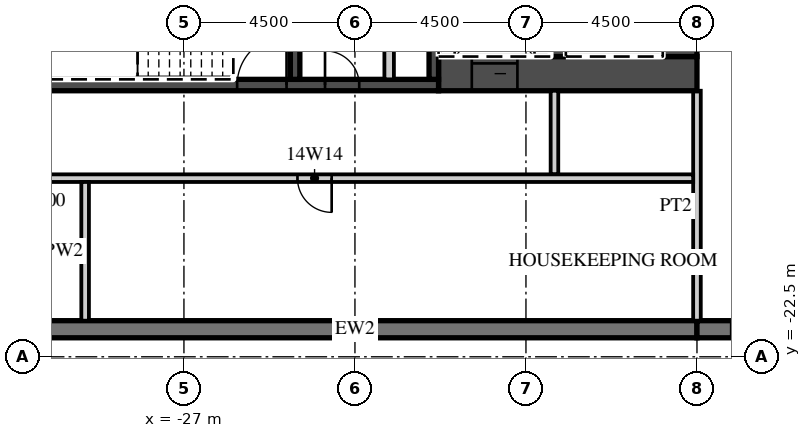
"""IFC4 building model, lengths in metres.
Left out: names, types, materials, properties, quantities, classifications, styles, units other than length and angle.
Written with IfcOpenShell. Run it as: python <this file> out.ifc"""

import sys

from ifc_helpers import new_model, si_unit, direction, frame, frame_2d, origin, place, context, subcontext, project, spatial, rectangle, extrude, element, fill, save


model = new_model("IFC4")
c1 = context("Model", 3, precision=1e-05, world=origin(), true_north=direction((0.0, 1.0)))
c2 = subcontext(c1, "Body", "Model", "MODEL_VIEW")
j1 = project(units=[si_unit("LENGTHUNIT", "METRE"), si_unit("PLANEANGLEUNIT", "RADIAN")], contexts=[c1])
p1 = place(None, origin())
s1 = spatial("IfcSite", under=j1, at=p1, CompositionType="ELEMENT")
p2 = place(p1, origin())
s2 = spatial("IfcBuilding", under=s1, at=p2, CompositionType="ELEMENT")
p3 = place(p2, frame((0.0, 0.0, 76.5)))
s3 = spatial("IfcBuildingStorey", under=s2, at=p3, CompositionType="ELEMENT", Elevation=76.5)
p4 = place(p3, frame((-31.5, -21.775, 0.0), z_axis=(0.0, 0.0, 1.0), x_axis=(1.0, 0.0, 0.0)))
e1 = element("IfcWall", 1, at=p4, inside=s3, PredefinedType="SOLIDWALL", context=c2, shape_type="SweptSolid", body=[
    extrude(rectangle(XDim=18.0, YDim=0.45, at=frame_2d((9.0, 0.0))), origin(), (0.0, 0.0, 1.0), 3.02),
])
p5 = place(p3, frame((-13.5, -21.775, 0.0), z_axis=(0.0, 0.0, 1.0), x_axis=(1.0, 0.0, 0.0)))
e2 = element("IfcWall", 2, at=p5, inside=s3, PredefinedType="SOLIDWALL", context=c2, shape_type="SweptSolid", body=[
    extrude(rectangle(XDim=54.5, YDim=0.45, at=frame_2d((27.25, 0.0))), origin(), (0.0, 0.0, 1.0), 3.02),
])
p6 = place(p5, frame((0.9, 0.0, 0.45)))
e3 = element("IfcOpeningElement", 3, at=p6, cuts=e2, PredefinedType="OPENING", context=c2, shape_type="SweptSolid", body=[
    extrude(rectangle(XDim=2.7, YDim=2.25, at=frame_2d((1.35, 1.125))), frame((0.0, 0.235, 0.0), z_axis=(0.0, -1.0, 0.0), x_axis=(1.0, 0.0, 0.0)), (0.0, 0.0, 1.0), 0.47),
])
p7 = place(p5, frame((5.4, 0.0, 0.45)))
e4 = element("IfcOpeningElement", 4, at=p7, cuts=e2, PredefinedType="OPENING", context=c2, shape_type="SweptSolid", body=[
    extrude(rectangle(XDim=2.7, YDim=2.25, at=frame_2d((1.35, 1.125))), frame((0.0, 0.235, 0.0), z_axis=(0.0, -1.0, 0.0), x_axis=(1.0, 0.0, 0.0)), (0.0, 0.0, 1.0), 0.47),
])
p8 = place(p5, frame((9.9, 0.0, 0.45)))
e5 = element("IfcOpeningElement", 5, at=p8, cuts=e2, PredefinedType="OPENING", context=c2, shape_type="SweptSolid", body=[
    extrude(rectangle(XDim=2.7, YDim=2.25, at=frame_2d((1.35, 1.125))), frame((0.0, 0.235, 0.0), z_axis=(0.0, -1.0, 0.0), x_axis=(1.0, 0.0, 0.0)), (0.0, 0.0, 1.0), 0.47),
])
p9 = place(p5, frame((14.4, 0.0, 0.45)))
e6 = element("IfcOpeningElement", 6, at=p9, cuts=e2, PredefinedType="OPENING", context=c2, shape_type="SweptSolid", body=[
    extrude(rectangle(XDim=2.7, YDim=2.25, at=frame_2d((1.35, 1.125))), frame((0.0, 0.235, 0.0), z_axis=(0.0, -1.0, 0.0), x_axis=(1.0, 0.0, 0.0)), (0.0, 0.0, 1.0), 0.47),
])
p10 = place(p5, frame((18.9, 0.0, 0.45)))
e7 = element("IfcOpeningElement", 7, at=p10, cuts=e2, PredefinedType="OPENING", context=c2, shape_type="SweptSolid", body=[
    extrude(rectangle(XDim=2.7, YDim=2.25, at=frame_2d((1.35, 1.125))), frame((0.0, 0.235, 0.0), z_axis=(0.0, -1.0, 0.0), x_axis=(1.0, 0.0, 0.0)), (0.0, 0.0, 1.0), 0.47),
])
p11 = place(p5, frame((23.4, 0.0, 0.45)))
e8 = element("IfcOpeningElement", 8, at=p11, cuts=e2, PredefinedType="OPENING", context=c2, shape_type="SweptSolid", body=[
    extrude(rectangle(XDim=2.7, YDim=2.25, at=frame_2d((1.35, 1.125))), frame((0.0, 0.235, 0.0), z_axis=(0.0, -1.0, 0.0), x_axis=(1.0, 0.0, 0.0)), (0.0, 0.0, 1.0), 0.47),
])
p12 = place(p5, frame((27.9, 0.0, 0.45)))
e9 = element("IfcOpeningElement", 9, at=p12, cuts=e2, PredefinedType="OPENING", context=c2, shape_type="SweptSolid", body=[
    extrude(rectangle(XDim=2.7, YDim=2.25, at=frame_2d((1.35, 1.125))), frame((0.0, 0.235, 0.0), z_axis=(0.0, -1.0, 0.0), x_axis=(1.0, 0.0, 0.0)), (0.0, 0.0, 1.0), 0.47),
])
p13 = place(p5, frame((32.4, 0.0, 0.45)))
e10 = element("IfcOpeningElement", 10, at=p13, cuts=e2, PredefinedType="OPENING", context=c2, shape_type="SweptSolid", body=[
    extrude(rectangle(XDim=2.7, YDim=2.25, at=frame_2d((1.35, 1.125))), frame((0.0, 0.235, 0.0), z_axis=(0.0, -1.0, 0.0), x_axis=(1.0, 0.0, 0.0)), (0.0, 0.0, 1.0), 0.47),
])
p14 = place(p5, frame((36.9, 0.0, 0.45)))
e11 = element("IfcOpeningElement", 11, at=p14, cuts=e2, PredefinedType="OPENING", context=c2, shape_type="SweptSolid", body=[
    extrude(rectangle(XDim=2.7, YDim=2.25, at=frame_2d((1.35, 1.125))), frame((0.0, 0.235, 0.0), z_axis=(0.0, -1.0, 0.0), x_axis=(1.0, 0.0, 0.0)), (0.0, 0.0, 1.0), 0.47),
])
p15 = place(p5, frame((41.4, 0.0, 0.45)))
e12 = element("IfcOpeningElement", 12, at=p15, cuts=e2, PredefinedType="OPENING", context=c2, shape_type="SweptSolid", body=[
    extrude(rectangle(XDim=2.7, YDim=2.25, at=frame_2d((1.35, 1.125))), frame((0.0, 0.235, 0.0), z_axis=(0.0, -1.0, 0.0), x_axis=(1.0, 0.0, 0.0)), (0.0, 0.0, 1.0), 0.47),
])
p16 = place(p5, frame((45.9, 0.0, 0.45)))
e13 = element("IfcOpeningElement", 13, at=p16, cuts=e2, PredefinedType="OPENING", context=c2, shape_type="SweptSolid", body=[
    extrude(rectangle(XDim=2.7, YDim=2.25, at=frame_2d((1.35, 1.125))), frame((0.0, 0.235, 0.0), z_axis=(0.0, -1.0, 0.0), x_axis=(1.0, 0.0, 0.0)), (0.0, 0.0, 1.0), 0.47),
])
p17 = place(p5, frame((50.4, 0.0, 0.45)))
e14 = element("IfcOpeningElement", 14, at=p17, cuts=e2, PredefinedType="OPENING", context=c2, shape_type="SweptSolid", body=[
    extrude(rectangle(XDim=2.7, YDim=2.25, at=frame_2d((1.35, 1.125))), frame((0.0, 0.235, 0.0), z_axis=(0.0, -1.0, 0.0), x_axis=(1.0, 0.0, 0.0)), (0.0, 0.0, 1.0), 0.47),
])
p18 = place(p3, frame((-13.5, -21.55, 0.0), z_axis=(0.0, 0.0, 1.0), x_axis=(0.0, 1.0, 0.0)))
e15 = element("IfcWall", 15, at=p18, inside=s3, PredefinedType="PARTITIONING", context=c2, shape_type="SweptSolid", body=[
    extrude(rectangle(XDim=6.05, YDim=0.2, at=frame_2d((3.025, 0.0))), origin(), (0.0, 0.0, 1.0), 3.02),
])
p19 = place(p3, frame((-20.3, -15.05, 0.0), z_axis=(0.0, 0.0, 1.0), x_axis=(1.0, 0.0, 0.0)))
e16 = element("IfcWall", 16, at=p19, inside=s3, PredefinedType="SHEAR", context=c2, shape_type="SweptSolid", body=[
    extrude(rectangle(XDim=6.8, YDim=0.9, at=frame_2d((3.4, 0.0))), origin(), (0.0, 0.0, 1.0), 3.02),
])
p20 = place(p19, frame((0.875, 0.0, 0.0)))
e17 = element("IfcOpeningElement", 17, at=p20, cuts=e16, PredefinedType="OPENING", context=c2, shape_type="SweptSolid", body=[
    extrude(rectangle(XDim=1.2, YDim=2.1, at=frame_2d((0.6, 1.05))), frame((0.0, 0.46, 0.0), z_axis=(0.0, -1.0, 0.0), x_axis=(1.0, 0.0, 0.0)), (0.0, 0.0, 1.0), 0.92),
])
p21 = place(p3, frame((-30.6, -15.35, 0.0), z_axis=(0.0, 0.0, 1.0), x_axis=(1.0, 0.0, 0.0)))
e18 = element("IfcWall", 18, at=p21, inside=s3, PredefinedType="SHEAR", context=c2, shape_type="SweptSolid", body=[
    extrude(rectangle(XDim=10.3, YDim=0.3, at=frame_2d((5.15, 0.0))), origin(), (0.0, 0.0, 1.0), 3.02),
])
p22 = place(p21, frame((5.0, 0.0, 0.0)))
e19 = element("IfcOpeningElement", 19, at=p22, cuts=e18, PredefinedType="OPENING", context=c2, shape_type="SweptSolid", body=[
    extrude(rectangle(XDim=1.3, YDim=2.1, at=frame_2d((0.65, 1.05))), frame((0.0, 0.16, 0.0), z_axis=(0.0, -1.0, 0.0), x_axis=(1.0, 0.0, 0.0)), (0.0, 0.0, 1.0), 0.32),
])
p23 = place(p21, frame((7.312, 0.0, 0.0)))
e20 = element("IfcOpeningElement", 20, at=p23, cuts=e18, PredefinedType="OPENING", context=c2, shape_type="SweptSolid", body=[
    extrude(rectangle(XDim=0.9, YDim=2.1, at=frame_2d((0.45, 1.05))), frame((0.0, 0.16, 0.0), z_axis=(0.0, -1.0, 0.0), x_axis=(1.0, 0.0, 0.0)), (0.0, 0.0, 1.0), 0.32),
])
p24 = place(p3, frame((-13.95, -14.6, 0.0), z_axis=(0.0, 0.0, 1.0), x_axis=(0.0, 1.0, 0.0)))
e21 = element("IfcWall", 21, at=p24, inside=s3, PredefinedType="SHEAR", context=c2, shape_type="SweptSolid", body=[
    extrude(rectangle(XDim=12.2, YDim=0.9, at=frame_2d((6.1, 0.0))), origin(), (0.0, 0.0, 1.0), 3.02),
])
p25 = place(p3, frame((-17.15, -14.6, 0.0), z_axis=(0.0, 0.0, 1.0), x_axis=(0.0, 1.0, 0.0)))
e22 = element("IfcWall", 22, at=p25, inside=s3, PredefinedType="SHEAR", context=c2, shape_type="SweptSolid", body=[
    extrude(rectangle(XDim=5.8, YDim=0.4, at=frame_2d((2.9, 0.0))), origin(), (0.0, 0.0, 1.0), 3.02),
])
for number, where, z_axis, x_axis in (
    (23, (-20.425, -15.2, 0.0), (0.0, 0.0, 1.0), (0.0, 1.0, 0.0)),
    (24, (-24.075, -15.2, 0.0), (0.0, 0.0, 1.0), (0.0, 1.0, 0.0)),
):
    element("IfcWall", number, at=place(p3, frame(where, z_axis=z_axis, x_axis=x_axis)), inside=s3, PredefinedType="SHEAR", context=c2, shape_type="SweptSolid", body=[
        extrude(rectangle(XDim=3.25, YDim=0.25, at=frame_2d((1.625, 0.0))), origin(), (0.0, 0.0, 1.0), 3.02),
    ])
p26 = place(p3, frame((-21.6, -15.2, 0.0), z_axis=(0.0, 0.0, 1.0), x_axis=(0.0, 1.0, 0.0)))
e25 = element("IfcWall", 25, at=p26, inside=s3, PredefinedType="PARTITIONING", context=c2, shape_type="SweptSolid", body=[
    extrude(rectangle(XDim=3.25, YDim=0.25, at=frame_2d((1.625, 0.0))), origin(), (0.0, 0.0, 1.0), 3.02),
])
p27 = place(p3, frame((-17.25, -17.7, 0.0), z_axis=(0.0, 0.0, 1.0), x_axis=(0.0, 1.0, 0.0)))
e26 = element("IfcWall", 26, at=p27, inside=s3, PredefinedType="PARTITIONING", context=c2, shape_type="SweptSolid", body=[
    extrude(rectangle(XDim=2.2, YDim=0.2, at=frame_2d((1.1, 0.0))), origin(), (0.0, 0.0, 1.0), 3.02),
])
p28 = place(p3, frame((-44.55, -17.8, 0.0), z_axis=(0.0, 0.0, 1.0), x_axis=(1.0, 0.0, 0.0)))
e27 = element("IfcWall", 27, at=p28, inside=s3, PredefinedType="PARTITIONING", context=c2, shape_type="SweptSolid", body=[
    extrude(rectangle(XDim=30.95, YDim=0.2, at=frame_2d((15.475, 0.0))), origin(), (0.0, 0.0, 1.0), 3.02),
])
p29 = place(p28, frame((12.238, 0.0, 0.0)))
e28 = element("IfcOpeningElement", 28, at=p29, cuts=e27, PredefinedType="OPENING", context=c2, shape_type="SweptSolid", body=[
    extrude(rectangle(XDim=0.9, YDim=2.1, at=frame_2d((0.45, 1.05))), frame((0.0, 0.11, 0.0), z_axis=(0.0, -1.0, 0.0), x_axis=(1.0, 0.0, 0.0)), (0.0, 0.0, 1.0), 0.22),
])
p30 = place(p28, frame((20.538, 0.0, 0.0)))
e29 = element("IfcOpeningElement", 29, at=p30, cuts=e27, PredefinedType="OPENING", context=c2, shape_type="SweptSolid", body=[
    extrude(rectangle(XDim=0.9, YDim=2.1, at=frame_2d((0.45, 1.05))), frame((0.0, 0.11, 0.0), z_axis=(0.0, -1.0, 0.0), x_axis=(1.0, 0.0, 0.0)), (0.0, 0.0, 1.0), 0.22),
])
p31 = place(p3, frame((-29.6, -21.55, 0.0), z_axis=(0.0, 0.0, 1.0), x_axis=(0.0, 1.0, 0.0)))
e30 = element("IfcWall", 30, at=p31, inside=s3, PredefinedType="PARTITIONING", context=c2, shape_type="SweptSolid", body=[
    extrude(rectangle(XDim=3.65, YDim=0.2, at=frame_2d((1.825, 0.0))), origin(), (0.0, 0.0, 1.0), 3.02),
])
p32 = place(p20, origin())
e31 = element("IfcDoor", 31, at=p32, inside=s3, OperationType="SLIDING_TO_LEFT", PredefinedType="DOOR", context=c2, shape_type="SweptSolid", body=[
    extrude(rectangle(XDim=1.2, YDim=2.1, at=frame_2d((0.6, 1.05))), frame((0.0, 0.025, 0.0), z_axis=(0.0, -1.0, 0.0), x_axis=(1.0, 0.0, 0.0)), (0.0, 0.0, 1.0), 0.05),
])
fill(e17, e31)
p33 = place(p22, origin())
e32 = element("IfcDoor", 32, at=p33, inside=s3, OperationType="SINGLE_SWING_RIGHT", PredefinedType="DOOR", context=c2, shape_type="SweptSolid", body=[
    extrude(rectangle(XDim=1.3, YDim=2.1, at=frame_2d((0.65, 1.05))), frame((0.0, 0.025, 0.0), z_axis=(0.0, -1.0, 0.0), x_axis=(1.0, 0.0, 0.0)), (0.0, 0.0, 1.0), 0.05),
])
fill(e19, e32)
p34 = place(p23, origin())
e33 = element("IfcDoor", 33, at=p34, inside=s3, OperationType="SINGLE_SWING_LEFT", PredefinedType="DOOR", context=c2, shape_type="SweptSolid", body=[
    extrude(rectangle(XDim=0.9, YDim=2.1, at=frame_2d((0.45, 1.05))), frame((0.0, 0.025, 0.0), z_axis=(0.0, -1.0, 0.0), x_axis=(1.0, 0.0, 0.0)), (0.0, 0.0, 1.0), 0.05),
])
fill(e20, e33)
p35 = place(p30, origin())
e34 = element("IfcDoor", 34, at=p35, inside=s3, OperationType="SINGLE_SWING_RIGHT", PredefinedType="DOOR", context=c2, shape_type="SweptSolid", body=[
    extrude(rectangle(XDim=0.9, YDim=2.1, at=frame_2d((0.45, 1.05))), frame((0.0, 0.025, 0.0), z_axis=(0.0, -1.0, 0.0), x_axis=(1.0, 0.0, 0.0)), (0.0, 0.0, 1.0), 0.05),
])
fill(e29, e34)
save(model, sys.argv[1])
